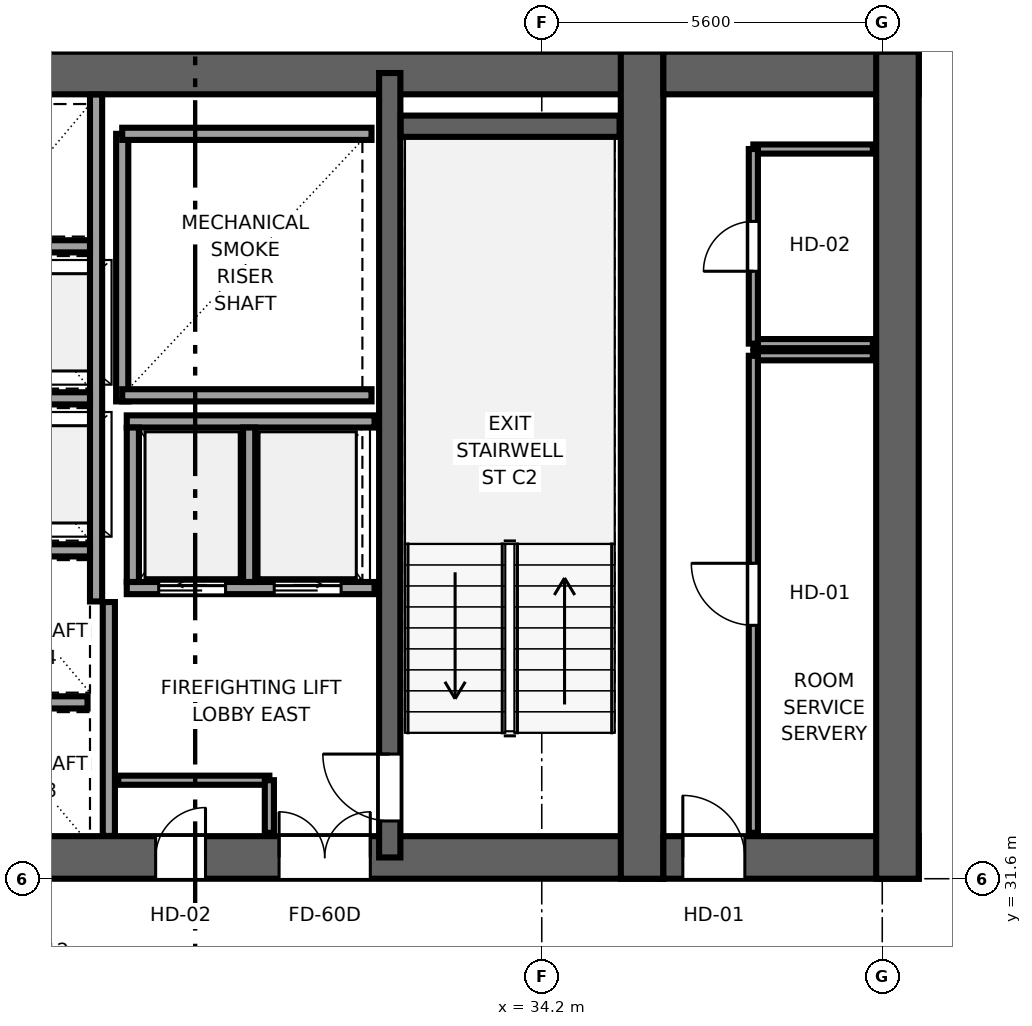
"""IFC4 building model, lengths in metres.
Left out: names, types, materials, properties, quantities, classifications, styles, units other than length and angle.
Written with IfcOpenShell. Run it as: python <this file> out.ifc"""

import sys

from ifc_helpers import new_model, si_unit, direction, frame, frame_2d, origin, place, context, subcontext, project, spatial, rectangle, extrude, source, transform, mapped, element, fill, save


model = new_model("IFC4")
c1 = context("Model", 3, precision=1e-05, world=origin(), true_north=direction((0.0, 1.0)))
c2 = subcontext(c1, "Body", "Model", "MODEL_VIEW")
j1 = project(units=[si_unit("LENGTHUNIT", "METRE"), si_unit("PLANEANGLEUNIT", "RADIAN")], contexts=[c1])
p1 = place(None, origin())
s1 = spatial("IfcSite", under=j1, at=p1, CompositionType="ELEMENT")
p2 = place(p1, origin())
s2 = spatial("IfcBuilding", under=s1, at=p2, CompositionType="ELEMENT")
p3 = place(p2, frame((0.0, 0.0, 125.75)))
s3 = spatial("IfcBuildingStorey", under=s2, at=p3, CompositionType="ELEMENT", Elevation=125.75)
p4 = place(p3, frame((9.8, 31.95, 0.0), z_axis=(0.0, 0.0, 1.0), x_axis=(1.0, 0.0, 0.0)))
e1 = element("IfcWall", 1, at=p4, inside=s3, PredefinedType="SHEAR", context=c2, shape_type="SweptSolid", body=[
    extrude(rectangle(XDim=26.4, YDim=0.7, at=frame_2d((13.2, 0.0))), origin(), (0.0, 0.0, 1.0), 3.55),
])
p5 = place(p4, frame((6.32, 0.0, 0.0), z_axis=(0.0, 0.0, 1.0), x_axis=(-1.0, 0.0, 0.0)))
e2 = element("IfcOpeningElement", 2, at=p5, cuts=e1, PredefinedType="OPENING", context=c2, shape_type="SweptSolid", body=[
    extrude(rectangle(XDim=1.5, YDim=2.04, at=frame_2d((0.75, 1.02))), frame((0.0, 0.36, 0.0), z_axis=(0.0, -1.0, 0.0), x_axis=(1.0, 0.0, 0.0)), (0.0, 0.0, 1.0), 0.72),
])
p6 = place(p4, frame((13.95, 0.0, 0.0), z_axis=(0.0, 0.0, 1.0), x_axis=(-1.0, 0.0, 0.0)))
e3 = element("IfcOpeningElement", 3, at=p6, cuts=e1, PredefinedType="OPENING", context=c2, shape_type="SweptSolid", body=[
    extrude(rectangle(XDim=1.5, YDim=2.04, at=frame_2d((0.75, 1.02))), frame((0.0, 0.36, 0.0), z_axis=(0.0, -1.0, 0.0), x_axis=(1.0, 0.0, 0.0)), (0.0, 0.0, 1.0), 0.72),
])
p7 = place(p4, frame((21.58, 0.0, 0.0), z_axis=(0.0, 0.0, 1.0), x_axis=(-1.0, 0.0, 0.0)))
e4 = element("IfcOpeningElement", 4, at=p7, cuts=e1, PredefinedType="OPENING", context=c2, shape_type="SweptSolid", body=[
    extrude(rectangle(XDim=1.5, YDim=2.04, at=frame_2d((0.75, 1.02))), frame((0.0, 0.36, 0.0), z_axis=(0.0, -1.0, 0.0), x_axis=(1.0, 0.0, 0.0)), (0.0, 0.0, 1.0), 0.72),
])
p8 = place(p4, frame((8.37, 0.0, 0.0), z_axis=(0.0, 0.0, 1.0), x_axis=(-1.0, 0.0, 0.0)))
e5 = element("IfcOpeningElement", 5, at=p8, cuts=e1, PredefinedType="OPENING", context=c2, shape_type="SweptSolid", body=[
    extrude(rectangle(XDim=0.82, YDim=2.01, at=frame_2d((0.41, 1.005))), frame((0.0, 0.36, 0.0), z_axis=(0.0, -1.0, 0.0), x_axis=(1.0, 0.0, 0.0)), (0.0, 0.0, 1.0), 0.72),
])
p9 = place(p4, frame((18.87, 0.0, 0.0), z_axis=(0.0, 0.0, 1.0), x_axis=(-1.0, 0.0, 0.0)))
e6 = element("IfcOpeningElement", 6, at=p9, cuts=e1, PredefinedType="OPENING", context=c2, shape_type="SweptSolid", body=[
    extrude(rectangle(XDim=0.82, YDim=2.01, at=frame_2d((0.41, 1.005))), frame((0.0, 0.36, 0.0), z_axis=(0.0, -1.0, 0.0), x_axis=(1.0, 0.0, 0.0)), (0.0, 0.0, 1.0), 0.72),
])
p10 = place(p3, frame((9.8, 44.85, 0.0), z_axis=(0.0, 0.0, 1.0), x_axis=(1.0, 0.0, 0.0)))
e7 = element("IfcWall", 7, at=p10, inside=s3, PredefinedType="SHEAR", context=c2, shape_type="SweptSolid", body=[
    extrude(rectangle(XDim=26.4, YDim=0.7, at=frame_2d((13.2, 0.0))), origin(), (0.0, 0.0, 1.0), 3.55),
])
p11 = place(p3, frame((35.85, 31.6, 0.0), z_axis=(0.0, 0.0, 1.0), x_axis=(0.0, 1.0, 0.0)))
e8 = element("IfcWall", 8, at=p11, inside=s3, PredefinedType="SHEAR", context=c2, shape_type="SweptSolid", body=[
    extrude(rectangle(XDim=13.6, YDim=0.7, at=frame_2d((6.8, 0.0))), origin(), (0.0, 0.0, 1.0), 3.55),
])
p12 = place(p3, frame((31.7, 31.95, 0.0), z_axis=(0.0, 0.0, 1.0), x_axis=(0.0, 1.0, 0.0)))
e9 = element("IfcWall", 9, at=p12, inside=s3, PredefinedType="SHEAR", context=c2, shape_type="SweptSolid", body=[
    extrude(rectangle(XDim=12.9, YDim=0.35, at=frame_2d((6.45, 0.0))), origin(), (0.0, 0.0, 1.0), 3.55),
])
p13 = place(p12, frame((1.7, 0.0, 0.0), z_axis=(0.0, 0.0, 1.0), x_axis=(-1.0, 0.0, 0.0)))
e10 = element("IfcOpeningElement", 10, at=p13, cuts=e9, PredefinedType="OPENING", context=c2, shape_type="SweptSolid", body=[
    extrude(rectangle(XDim=1.1, YDim=2.12, at=frame_2d((0.55, 1.06))), frame((0.0, 0.185, 0.0), z_axis=(0.0, -1.0, 0.0), x_axis=(1.0, 0.0, 0.0)), (0.0, 0.0, 1.0), 0.37),
])
p14 = place(p3, frame((36.2, 31.95, 0.0), z_axis=(0.0, 0.0, 1.0), x_axis=(1.0, 0.0, 0.0)))
e11 = element("IfcWall", 11, at=p14, inside=s3, PredefinedType="SHEAR", context=c2, shape_type="SweptSolid", body=[
    extrude(rectangle(XDim=4.2, YDim=0.7, at=frame_2d((2.1, 0.0))), origin(), (0.0, 0.0, 1.0), 3.55),
])
p15 = place(p14, frame((1.34, 0.0, 0.0), z_axis=(0.0, 0.0, 1.0), x_axis=(-1.0, 0.0, 0.0)))
e12 = element("IfcOpeningElement", 12, at=p15, cuts=e11, PredefinedType="OPENING", context=c2, shape_type="SweptSolid", body=[
    extrude(rectangle(XDim=1.02, YDim=2.03, at=frame_2d((0.51, 1.015))), frame((0.0, 0.36, 0.0), z_axis=(0.0, -1.0, 0.0), x_axis=(1.0, 0.0, 0.0)), (0.0, 0.0, 1.0), 0.72),
])
p16 = place(p3, frame((36.2, 44.85, 0.0), z_axis=(0.0, 0.0, 1.0), x_axis=(1.0, 0.0, 0.0)))
e13 = element("IfcWall", 13, at=p16, inside=s3, PredefinedType="SHEAR", context=c2, shape_type="SweptSolid", body=[
    extrude(rectangle(XDim=4.2, YDim=0.7, at=frame_2d((2.1, 0.0))), origin(), (0.0, 0.0, 1.0), 3.55),
])
p17 = place(p3, frame((40.05, 31.6, 0.0), z_axis=(0.0, 0.0, 1.0), x_axis=(0.0, 1.0, 0.0)))
e14 = element("IfcWall", 14, at=p17, inside=s3, PredefinedType="SHEAR", context=c2, shape_type="SweptSolid", body=[
    extrude(rectangle(XDim=13.6, YDim=0.7, at=frame_2d((6.8, 0.0))), origin(), (0.0, 0.0, 1.0), 3.55),
])
p18 = place(p3, frame((31.88, 43.975, 0.0), z_axis=(0.0, 0.0, 1.0), x_axis=(1.0, 0.0, 0.0)))
e15 = element("IfcWall", 15, at=p18, inside=s3, PredefinedType="SHEAR", context=c2, shape_type="SweptSolid", body=[
    extrude(rectangle(XDim=3.6, YDim=0.35, at=frame_2d((1.8, 0.0))), origin(), (0.0, 0.0, 1.0), 3.55),
])
p19 = place(p3, frame((27.3, 39.45, 0.0), z_axis=(0.0, 0.0, 1.0), x_axis=(0.0, 1.0, 0.0)))
e16 = element("IfcWall", 16, at=p19, inside=s3, PredefinedType="SOLIDWALL", context=c2, shape_type="SweptSolid", body=[
    extrude(rectangle(XDim=4.4, YDim=0.2, at=frame_2d((2.2, 0.0))), origin(), (0.0, 0.0, 1.0), 3.37),
])
for number, where, z_axis, x_axis in (
    (17, (27.3, 39.55, 0.0), (0.0, 0.0, 1.0), (1.0, 0.0, 0.0)),
    (18, (27.3, 43.85, 0.0), (0.0, 0.0, 1.0), (1.0, 0.0, 0.0)),
):
    element("IfcWall", number, at=place(p3, frame(where, z_axis=z_axis, x_axis=x_axis)), inside=s3, PredefinedType="SOLIDWALL", context=c2, shape_type="SweptSolid", body=[
        extrude(rectangle(XDim=4.1, YDim=0.2, at=frame_2d((2.05, 0.0))), origin(), (0.0, 0.0, 1.0), 3.37),
    ])
p20 = place(p3, frame((27.08, 32.304, 0.0), z_axis=(0.0, 0.0, 1.0), x_axis=(0.0, 1.0, 0.0)))
e19 = element("IfcWall", 19, at=p20, inside=s3, PredefinedType="SOLIDWALL", context=c2, shape_type="SweptSolid", body=[
    extrude(rectangle(XDim=3.846, YDim=0.2, at=frame_2d((1.923, 0.0))), origin(), (0.0, 0.0, 1.0), 3.37),
])
p21 = place(p3, frame((27.375, 36.38, 0.0), z_axis=(0.0, 0.0, 1.0), x_axis=(1.0, 0.0, 0.0)))
e20 = element("IfcWall", 20, at=p21, inside=s3, PredefinedType="SOLIDWALL", context=c2, shape_type="SweptSolid", body=[
    extrude(rectangle(XDim=4.075, YDim=0.2, at=frame_2d((2.038, 0.0))), origin(), (0.0, 0.0, 1.0), 3.37),
])
p22 = place(p21, frame((0.525, 0.0, 0.0)))
e21 = element("IfcOpeningElement", 21, at=p22, cuts=e20, PredefinedType="OPENING", context=c2, shape_type="SweptSolid", body=[
    extrude(rectangle(XDim=1.1, YDim=2.12, at=frame_2d((0.55, 1.06))), frame((0.0, 0.11, 0.0), z_axis=(0.0, -1.0, 0.0), x_axis=(1.0, 0.0, 0.0)), (0.0, 0.0, 1.0), 0.22),
])
p23 = place(p21, frame((2.425, 0.0, 0.0)))
e22 = element("IfcOpeningElement", 22, at=p23, cuts=e20, PredefinedType="OPENING", context=c2, shape_type="SweptSolid", body=[
    extrude(rectangle(XDim=1.1, YDim=2.12, at=frame_2d((0.55, 1.06))), frame((0.0, 0.11, 0.0), z_axis=(0.0, -1.0, 0.0), x_axis=(1.0, 0.0, 0.0)), (0.0, 0.0, 1.0), 0.22),
])
p24 = place(p3, frame((27.375, 39.12, 0.0), z_axis=(0.0, 0.0, 1.0), x_axis=(1.0, 0.0, 0.0)))
e23 = element("IfcWall", 23, at=p24, inside=s3, PredefinedType="SOLIDWALL", context=c2, shape_type="SweptSolid", body=[
    extrude(rectangle(XDim=4.075, YDim=0.2, at=frame_2d((2.038, 0.0))), origin(), (0.0, 0.0, 1.0), 3.37),
])
for number, where, z_axis, x_axis in (
    (24, (27.475, 36.48, 0.0), (0.0, 0.0, 1.0), (0.0, 1.0, 0.0)),
    (25, (29.387, 36.48, 0.0), (0.0, 0.0, 1.0), (0.0, 1.0, 0.0)),
):
    element("IfcWall", number, at=place(p3, frame(where, z_axis=z_axis, x_axis=x_axis)), inside=s3, PredefinedType="SOLIDWALL", context=c2, shape_type="SweptSolid", body=[
        extrude(rectangle(XDim=2.54, YDim=0.2, at=frame_2d((1.27, 0.0))), origin(), (0.0, 0.0, 1.0), 3.37),
    ])
p25 = place(p3, frame((26.87, 36.16, 0.0), z_axis=(0.0, 0.0, 1.0), x_axis=(0.0, 1.0, 0.0)))
e26 = element("IfcWall", 26, at=p25, inside=s3, PredefinedType="SOLIDWALL", context=c2, shape_type="SweptSolid", body=[
    extrude(rectangle(XDim=8.336, YDim=0.2, at=frame_2d((4.168, 0.0))), origin(), (0.0, 0.0, 1.0), 3.37),
])
p26 = place(p3, frame((24.93, 34.5, 0.0), z_axis=(0.0, 0.0, 1.0), x_axis=(1.0, 0.0, 0.0)))
e27 = element("IfcWall", 27, at=p26, inside=s3, PredefinedType="SOLIDWALL", context=c2, shape_type="SweptSolid", body=[
    extrude(rectangle(XDim=1.8, YDim=0.2, at=frame_2d((0.9, 0.0))), origin(), (0.0, 0.0, 1.0), 3.37),
])
for number, where, z_axis, x_axis in (
    (28, (24.93, 37.0, 0.0), (0.0, 0.0, 1.0), (1.0, 0.0, 0.0)),
    (29, (24.93, 39.5, 0.0), (0.0, 0.0, 1.0), (1.0, 0.0, 0.0)),
    (30, (24.93, 42.0, 0.0), (0.0, 0.0, 1.0), (1.0, 0.0, 0.0)),
):
    element("IfcWall", number, at=place(p3, frame(where, z_axis=z_axis, x_axis=x_axis)), inside=s3, PredefinedType="SOLIDWALL", context=c2, shape_type="SweptSolid", body=[
        extrude(rectangle(XDim=1.84, YDim=0.2, at=frame_2d((0.92, 0.0))), origin(), (0.0, 0.0, 1.0), 3.37),
    ])
p27 = place(p3, frame((27.235, 33.22, 0.0), z_axis=(0.0, 0.0, 1.0), x_axis=(1.0, 0.0, 0.0)))
e31 = element("IfcWall", 31, at=p27, inside=s3, PredefinedType="PARTITIONING", context=c2, shape_type="SweptSolid", body=[
    extrude(rectangle(XDim=2.485, YDim=0.15, at=frame_2d((1.242, 0.0))), origin(), (0.0, 0.0, 1.0), 3.37),
])
p28 = place(p3, frame((29.72, 32.355, 0.0), z_axis=(0.0, 0.0, 1.0), x_axis=(0.0, 1.0, 0.0)))
e32 = element("IfcWall", 32, at=p28, inside=s3, PredefinedType="PARTITIONING", context=c2, shape_type="SweptSolid", body=[
    extrude(rectangle(XDim=0.865, YDim=0.15, at=frame_2d((0.433, 0.0))), origin(), (0.0, 0.0, 1.0), 3.37),
])
p29 = place(p3, frame((37.68, 40.2, 0.0), z_axis=(0.0, 0.0, 1.0), x_axis=(1.0, 0.0, 0.0)))
e33 = element("IfcWall", 33, at=p29, inside=s3, PredefinedType="PARTITIONING", context=c2, shape_type="SweptSolid", body=[
    extrude(rectangle(XDim=1.965, YDim=0.15, at=frame_2d((0.982, 0.0))), origin(), (0.0, 0.0, 1.0), 3.37),
])
p30 = place(p3, frame((37.68, 32.355, 0.0), z_axis=(0.0, 0.0, 1.0), x_axis=(0.0, 1.0, 0.0)))
e34 = element("IfcWall", 34, at=p30, inside=s3, PredefinedType="PARTITIONING", context=c2, shape_type="SweptSolid", body=[
    extrude(rectangle(XDim=7.845, YDim=0.15, at=frame_2d((3.922, 0.0))), origin(), (0.0, 0.0, 1.0), 3.37),
])
p31 = place(p30, frame((3.413, 0.0, 0.0)))
e35 = element("IfcOpeningElement", 35, at=p31, cuts=e34, PredefinedType="OPENING", context=c2, shape_type="SweptSolid", body=[
    extrude(rectangle(XDim=1.02, YDim=2.03, at=frame_2d((0.51, 1.015))), frame((0.0, 0.085, 0.0), z_axis=(0.0, -1.0, 0.0), x_axis=(1.0, 0.0, 0.0)), (0.0, 0.0, 1.0), 0.17),
])
for number, where, z_axis, x_axis in (
    (36, (37.68, 40.4, 0.0), (0.0, 0.0, 1.0), (1.0, 0.0, 0.0)),
    (37, (37.68, 43.6, 0.0), (0.0, 0.0, 1.0), (1.0, 0.0, 0.0)),
):
    element("IfcWall", number, at=place(p3, frame(where, z_axis=z_axis, x_axis=x_axis)), inside=s3, PredefinedType="PARTITIONING", context=c2, shape_type="SweptSolid", body=[
        extrude(rectangle(XDim=1.965, YDim=0.15, at=frame_2d((0.982, 0.0))), origin(), (0.0, 0.0, 1.0), 3.37),
    ])
p32 = place(p3, frame((37.68, 40.4, 0.0), z_axis=(0.0, 0.0, 1.0), x_axis=(0.0, 1.0, 0.0)))
e38 = element("IfcWall", 38, at=p32, inside=s3, PredefinedType="PARTITIONING", context=c2, shape_type="SweptSolid", body=[
    extrude(rectangle(XDim=3.2, YDim=0.15, at=frame_2d((1.6, 0.0))), origin(), (0.0, 0.0, 1.0), 3.37),
])
p33 = place(p32, frame((1.19, 0.0, 0.0)))
e39 = element("IfcOpeningElement", 39, at=p33, cuts=e38, PredefinedType="OPENING", context=c2, shape_type="SweptSolid", body=[
    extrude(rectangle(XDim=0.82, YDim=2.01, at=frame_2d((0.41, 1.005))), frame((0.0, 0.085, 0.0), z_axis=(0.0, -1.0, 0.0), x_axis=(1.0, 0.0, 0.0)), (0.0, 0.0, 1.0), 0.17),
])
m1 = source(origin(), c2, "Body", "SweptSolid", [
    extrude(rectangle(XDim=1.1, YDim=2.12, at=frame_2d((0.55, 1.06))), frame((0.0, 0.025, 0.0), z_axis=(0.0, -1.0, 0.0), x_axis=(1.0, 0.0, 0.0)), (0.0, 0.0, 1.0), 0.05),
])
p34 = place(p13, origin())
e40 = element("IfcDoor", 40, at=p34, inside=s3, OperationType="SINGLE_SWING_RIGHT", PredefinedType="DOOR", context=c2, shape_type="MappedRepresentation", body=[
    mapped(m1, transform((0.0, 0.0, 0.0), x_axis=(1.0, 0.0, 0.0), y_axis=(0.0, 1.0, 0.0), z_axis=(0.0, 0.0, 1.0), scale=1.0)),
])
fill(e10, e40)
m2 = source(origin(), c2, "Body", "SweptSolid", [
    extrude(rectangle(XDim=1.5, YDim=2.04, at=frame_2d((0.75, 1.02))), frame((0.0, 0.025, 0.0), z_axis=(0.0, -1.0, 0.0), x_axis=(1.0, 0.0, 0.0)), (0.0, 0.0, 1.0), 0.05),
])
p35 = place(p7, origin())
e41 = element("IfcDoor", 41, at=p35, inside=s3, OperationType="DOUBLE_DOOR_SINGLE_SWING", PredefinedType="DOOR", context=c2, shape_type="MappedRepresentation", body=[
    mapped(m2, transform((0.0, 0.0, 0.0), x_axis=(1.0, 0.0, 0.0), y_axis=(0.0, 1.0, 0.0), z_axis=(0.0, 0.0, 1.0), scale=1.0)),
])
fill(e4, e41)
m3 = source(origin(), c2, "Body", "SweptSolid", [
    extrude(rectangle(XDim=0.82, YDim=2.01, at=frame_2d((0.41, 1.005))), frame((0.0, 0.025, 0.0), z_axis=(0.0, -1.0, 0.0), x_axis=(1.0, 0.0, 0.0)), (0.0, 0.0, 1.0), 0.05),
])
p36 = place(p9, origin())
e42 = element("IfcDoor", 42, at=p36, inside=s3, OperationType="SINGLE_SWING_RIGHT", PredefinedType="DOOR", context=c2, shape_type="MappedRepresentation", body=[
    mapped(m3, transform((0.0, 0.0, 0.0), x_axis=(1.0, 0.0, 0.0), y_axis=(0.0, 1.0, 0.0), z_axis=(0.0, 0.0, 1.0), scale=1.0)),
])
fill(e6, e42)
m4 = source(origin(), c2, "Body", "SweptSolid", [
    extrude(rectangle(XDim=1.02, YDim=2.03, at=frame_2d((0.51, 1.015))), frame((0.0, 0.025, 0.0), z_axis=(0.0, -1.0, 0.0), x_axis=(1.0, 0.0, 0.0)), (0.0, 0.0, 1.0), 0.05),
])
p37 = place(p15, origin())
e43 = element("IfcDoor", 43, at=p37, inside=s3, OperationType="SINGLE_SWING_LEFT", PredefinedType="DOOR", context=c2, shape_type="MappedRepresentation", body=[
    mapped(m4, transform((0.0, 0.0, 0.0), x_axis=(1.0, 0.0, 0.0), y_axis=(0.0, 1.0, 0.0), z_axis=(0.0, 0.0, 1.0), scale=1.0)),
])
fill(e12, e43)
m5 = source(origin(), c2, "Body", "SweptSolid", [
    extrude(rectangle(XDim=1.1, YDim=2.12, at=frame_2d((0.55, 1.06))), frame((0.0, 0.025, 0.0), z_axis=(0.0, -1.0, 0.0), x_axis=(1.0, 0.0, 0.0)), (0.0, 0.0, 1.0), 0.05),
])
p38 = place(p22, origin())
e44 = element("IfcDoor", 44, at=p38, inside=s3, OperationType="SLIDING_TO_LEFT", PredefinedType="DOOR", context=c2, shape_type="MappedRepresentation", body=[
    mapped(m5, transform((0.0, 0.0, 0.0), x_axis=(1.0, 0.0, 0.0), y_axis=(0.0, 1.0, 0.0), z_axis=(0.0, 0.0, 1.0), scale=1.0)),
])
fill(e21, e44)
p39 = place(p23, origin())
e45 = element("IfcDoor", 45, at=p39, inside=s3, OperationType="SLIDING_TO_RIGHT", PredefinedType="DOOR", context=c2, shape_type="MappedRepresentation", body=[
    mapped(m5, transform((0.0, 0.0, 0.0), x_axis=(1.0, 0.0, 0.0), y_axis=(0.0, 1.0, 0.0), z_axis=(0.0, 0.0, 1.0), scale=1.0)),
])
fill(e22, e45)
p40 = place(p31, origin())
e46 = element("IfcDoor", 46, at=p40, inside=s3, OperationType="SINGLE_SWING_RIGHT", PredefinedType="DOOR", context=c2, shape_type="MappedRepresentation", body=[
    mapped(m4, transform((0.0, 0.0, 0.0), x_axis=(1.0, 0.0, 0.0), y_axis=(0.0, 1.0, 0.0), z_axis=(0.0, 0.0, 1.0), scale=1.0)),
])
fill(e35, e46)
p41 = place(p33, origin())
e47 = element("IfcDoor", 47, at=p41, inside=s3, OperationType="SINGLE_SWING_LEFT", PredefinedType="DOOR", context=c2, shape_type="MappedRepresentation", body=[
    mapped(m3, transform((0.0, 0.0, 0.0), x_axis=(1.0, 0.0, 0.0), y_axis=(0.0, 1.0, 0.0), z_axis=(0.0, 0.0, 1.0), scale=1.0)),
])
fill(e39, e47)
save(model, sys.argv[1])
